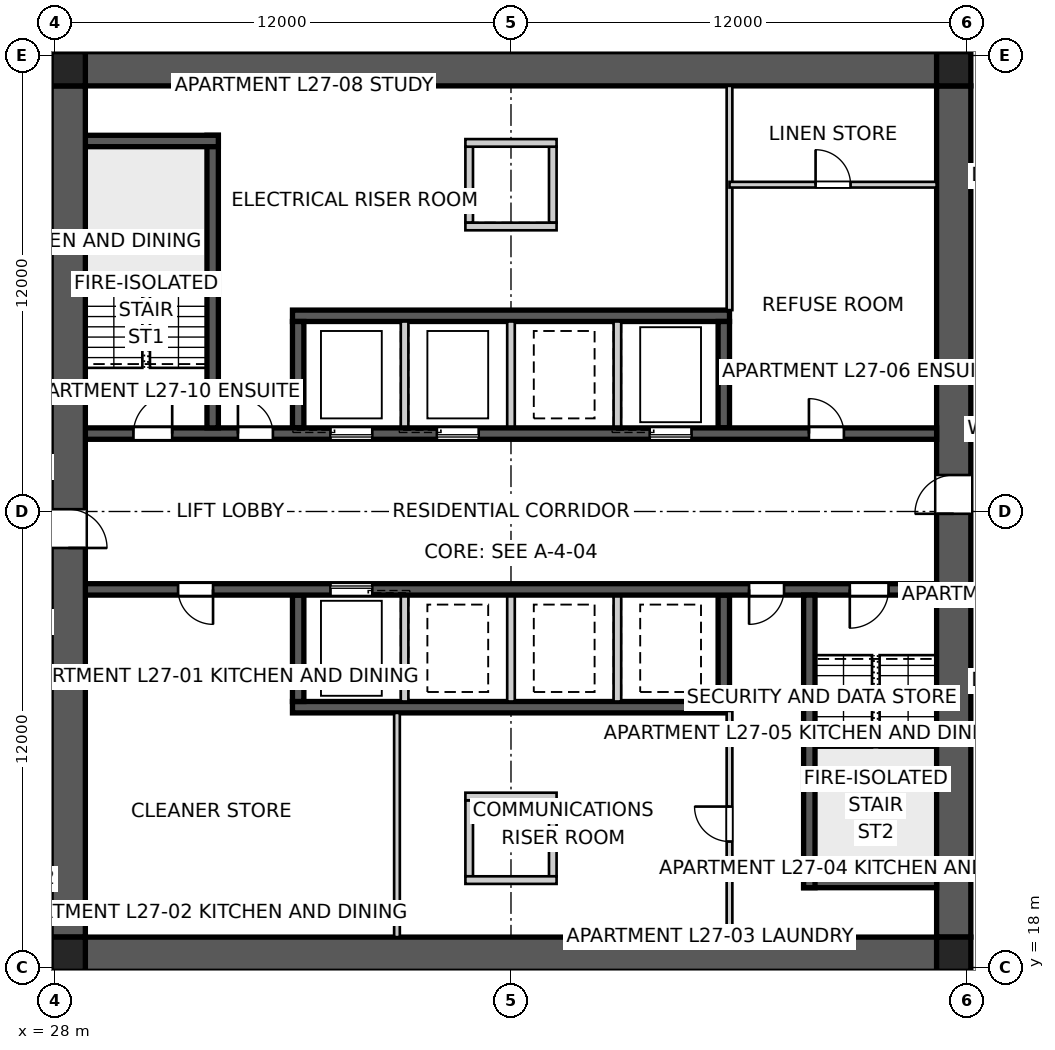
"""IFC4 building model, lengths in metres.
Left out: names, types, materials, properties, quantities, classifications, styles, units other than length and angle.
Written with IfcOpenShell. Run it as: python <this file> out.ifc"""

import sys

from ifc_helpers import new_model, si_unit, direction, frame, frame_2d, origin, origin_2d, place, context, subcontext, project, spatial, polyline, rectangle, outline, extrude, element, fill, save


model = new_model("IFC4")
c1 = context("Model", 3, precision=1e-05, world=origin(), true_north=direction((0.0, 1.0)))
c2 = subcontext(c1, "Body", "Model", "MODEL_VIEW")
j1 = project(units=[si_unit("LENGTHUNIT", "METRE"), si_unit("PLANEANGLEUNIT", "RADIAN")], contexts=[c1])
p1 = place(None, origin())
s1 = spatial("IfcSite", under=j1, at=p1, CompositionType="ELEMENT")
p2 = place(p1, origin())
s2 = spatial("IfcBuilding", under=s1, at=p2, CompositionType="ELEMENT")
p3 = place(p2, frame((0.0, 0.0, 99.8)))
s3 = spatial("IfcBuildingStorey", under=s2, at=p3, CompositionType="ELEMENT", Elevation=99.8)
for number, where, z_axis, x_axis in (
    (1, (28.8, 41.65, 0.0), (0.0, 0.0, 1.0), (1.0, 0.0, 0.0)),
    (2, (51.2, 18.35, 0.0), (0.0, 0.0, 1.0), (-1.0, 0.0, 0.0)),
):
    element("IfcWall", number, at=place(p3, frame(where, z_axis=z_axis, x_axis=x_axis)), inside=s3, PredefinedType="SHEAR", context=c2, shape_type="SweptSolid", body=[
        extrude(outline(polyline([(0.0, -0.45), (22.4, -0.45), (22.4, -0.025), (22.85, -0.025), (22.85, 0.025), (22.4, 0.025), (22.4, 0.45), (0.0, 0.45), (0.0, 0.025), (-0.45, 0.025), (-0.45, -0.025), (0.0, -0.025), (0.0, -0.45)])), origin(), (0.0, 0.0, 1.0), 3.4),
    ])
p4 = place(p3, frame((51.65, 18.8, 0.0), z_axis=(0.0, 0.0, 1.0), x_axis=(0.0, 1.0, 0.0)))
e3 = element("IfcWall", 3, at=p4, inside=s3, PredefinedType="SHEAR", context=c2, shape_type="SweptSolid", body=[
    extrude(outline(polyline([(0.0, -0.45), (22.4, -0.45), (22.4, -0.025), (22.85, -0.025), (22.85, 0.025), (22.4, 0.025), (22.4, 0.45), (0.0, 0.45), (0.0, 0.025), (-0.45, 0.025), (-0.45, -0.025), (0.0, -0.025), (0.0, -0.45)])), origin(), (0.0, 0.0, 1.0), 3.4),
])
p5 = place(p4, frame((11.14, 0.0, 0.0)))
e4 = element("IfcOpeningElement", 4, at=p5, cuts=e3, PredefinedType="OPENING", context=c2, shape_type="SweptSolid", body=[
    extrude(rectangle(XDim=1.02, YDim=2.4, at=frame_2d((0.51, 1.2))), frame((0.0, 0.46, 0.0), z_axis=(0.0, -1.0, 0.0), x_axis=(1.0, 0.0, 0.0)), (0.0, 0.0, 1.0), 0.92),
])
p6 = place(p3, frame((28.35, 41.2, 0.0), z_axis=(0.0, 0.0, 1.0), x_axis=(0.0, -1.0, 0.0)))
e5 = element("IfcWall", 5, at=p6, inside=s3, PredefinedType="SHEAR", context=c2, shape_type="SweptSolid", body=[
    extrude(outline(polyline([(0.0, -0.45), (22.4, -0.45), (22.4, -0.025), (22.85, -0.025), (22.85, 0.025), (22.4, 0.025), (22.4, 0.45), (0.0, 0.45), (0.0, 0.025), (-0.45, 0.025), (-0.45, -0.025), (0.0, -0.025), (0.0, -0.45)])), origin(), (0.0, 0.0, 1.0), 3.4),
])
p7 = place(p6, frame((11.14, 0.0, 0.0)))
e6 = element("IfcOpeningElement", 6, at=p7, cuts=e5, PredefinedType="OPENING", context=c2, shape_type="SweptSolid", body=[
    extrude(rectangle(XDim=1.02, YDim=2.4, at=frame_2d((0.51, 1.2))), frame((0.0, 0.46, 0.0), z_axis=(0.0, -1.0, 0.0), x_axis=(1.0, 0.0, 0.0)), (0.0, 0.0, 1.0), 0.92),
])
p8 = place(p3, frame((28.8, 32.05, 0.0), z_axis=(0.0, 0.0, 1.0), x_axis=(1.0, 0.0, 0.0)))
e7 = element("IfcWall", 7, at=p8, inside=s3, PredefinedType="SHEAR", context=c2, shape_type="SweptSolid", body=[
    extrude(rectangle(XDim=22.4, YDim=0.3, at=frame_2d((11.2, 0.0))), origin(), (0.0, 0.0, 1.0), 3.4),
])
p9 = place(p8, frame((19.04, 0.0, 0.0)))
e8 = element("IfcOpeningElement", 8, at=p9, cuts=e7, PredefinedType="OPENING", context=c2, shape_type="SweptSolid", body=[
    extrude(rectangle(XDim=0.92, YDim=2.1, at=frame_2d((0.46, 1.05))), frame((0.0, 0.16, 0.0), z_axis=(0.0, -1.0, 0.0), x_axis=(1.0, 0.0, 0.0)), (0.0, 0.0, 1.0), 0.32),
])
p10 = place(p8, frame((1.265, 0.0, 0.0)))
e9 = element("IfcOpeningElement", 9, at=p10, cuts=e7, PredefinedType="OPENING", context=c2, shape_type="SweptSolid", body=[
    extrude(rectangle(XDim=1.02, YDim=2.1, at=frame_2d((0.51, 1.05))), frame((0.0, 0.16, 0.0), z_axis=(0.0, -1.0, 0.0), x_axis=(1.0, 0.0, 0.0)), (0.0, 0.0, 1.0), 0.32),
])
p11 = place(p8, frame((4.015, 0.0, 0.0)))
e10 = element("IfcOpeningElement", 10, at=p11, cuts=e7, PredefinedType="OPENING", context=c2, shape_type="SweptSolid", body=[
    extrude(rectangle(XDim=0.92, YDim=2.1, at=frame_2d((0.46, 1.05))), frame((0.0, 0.16, 0.0), z_axis=(0.0, -1.0, 0.0), x_axis=(1.0, 0.0, 0.0)), (0.0, 0.0, 1.0), 0.32),
])
p12 = place(p8, frame((6.45, 0.0, 0.0)))
e11 = element("IfcOpeningElement", 11, at=p12, cuts=e7, PredefinedType="OPENING", context=c2, shape_type="SweptSolid", body=[
    extrude(rectangle(XDim=1.1, YDim=2.1, at=frame_2d((0.55, 1.05))), frame((0.0, 0.16, 0.0), z_axis=(0.0, -1.0, 0.0), x_axis=(1.0, 0.0, 0.0)), (0.0, 0.0, 1.0), 0.32),
])
p13 = place(p8, frame((9.25, 0.0, 0.0)))
e12 = element("IfcOpeningElement", 12, at=p13, cuts=e7, PredefinedType="OPENING", context=c2, shape_type="SweptSolid", body=[
    extrude(rectangle(XDim=1.1, YDim=2.1, at=frame_2d((0.55, 1.05))), frame((0.0, 0.16, 0.0), z_axis=(0.0, -1.0, 0.0), x_axis=(1.0, 0.0, 0.0)), (0.0, 0.0, 1.0), 0.32),
])
p14 = place(p8, frame((14.85, 0.0, 0.0)))
e13 = element("IfcOpeningElement", 13, at=p14, cuts=e7, PredefinedType="OPENING", context=c2, shape_type="SweptSolid", body=[
    extrude(rectangle(XDim=1.1, YDim=2.1, at=frame_2d((0.55, 1.05))), frame((0.0, 0.16, 0.0), z_axis=(0.0, -1.0, 0.0), x_axis=(1.0, 0.0, 0.0)), (0.0, 0.0, 1.0), 0.32),
])
p15 = place(p3, frame((51.2, 27.95, 0.0), z_axis=(0.0, 0.0, 1.0), x_axis=(-1.0, 0.0, 0.0)))
e14 = element("IfcWall", 14, at=p15, inside=s3, PredefinedType="SHEAR", context=c2, shape_type="SweptSolid", body=[
    extrude(rectangle(XDim=22.4, YDim=0.3, at=frame_2d((11.2, 0.0))), origin(), (0.0, 0.0, 1.0), 3.4),
])
p16 = place(p15, frame((19.04, 0.0, 0.0)))
e15 = element("IfcOpeningElement", 15, at=p16, cuts=e14, PredefinedType="OPENING", context=c2, shape_type="SweptSolid", body=[
    extrude(rectangle(XDim=0.92, YDim=2.1, at=frame_2d((0.46, 1.05))), frame((0.0, 0.16, 0.0), z_axis=(0.0, -1.0, 0.0), x_axis=(1.0, 0.0, 0.0)), (0.0, 0.0, 1.0), 0.32),
])
p17 = place(p15, frame((1.265, 0.0, 0.0)))
e16 = element("IfcOpeningElement", 16, at=p17, cuts=e14, PredefinedType="OPENING", context=c2, shape_type="SweptSolid", body=[
    extrude(rectangle(XDim=1.02, YDim=2.1, at=frame_2d((0.51, 1.05))), frame((0.0, 0.16, 0.0), z_axis=(0.0, -1.0, 0.0), x_axis=(1.0, 0.0, 0.0)), (0.0, 0.0, 1.0), 0.32),
])
p18 = place(p15, frame((4.015, 0.0, 0.0)))
e17 = element("IfcOpeningElement", 17, at=p18, cuts=e14, PredefinedType="OPENING", context=c2, shape_type="SweptSolid", body=[
    extrude(rectangle(XDim=0.92, YDim=2.1, at=frame_2d((0.46, 1.05))), frame((0.0, 0.16, 0.0), z_axis=(0.0, -1.0, 0.0), x_axis=(1.0, 0.0, 0.0)), (0.0, 0.0, 1.0), 0.32),
])
p19 = place(p15, frame((14.85, 0.0, 0.0)))
e18 = element("IfcOpeningElement", 18, at=p19, cuts=e14, PredefinedType="OPENING", context=c2, shape_type="SweptSolid", body=[
    extrude(rectangle(XDim=1.1, YDim=2.1, at=frame_2d((0.55, 1.05))), frame((0.0, 0.16, 0.0), z_axis=(0.0, -1.0, 0.0), x_axis=(1.0, 0.0, 0.0)), (0.0, 0.0, 1.0), 0.32),
])
for number, where, z_axis, x_axis in (
    (19, (34.25, 35.15, 0.0), (0.0, 0.0, 1.0), (1.0, 0.0, 0.0)),
    (20, (45.75, 24.85, 0.0), (0.0, 0.0, 1.0), (-1.0, 0.0, 0.0)),
):
    element("IfcWall", number, at=place(p3, frame(where, z_axis=z_axis, x_axis=x_axis)), inside=s3, PredefinedType="SHEAR", context=c2, shape_type="SweptSolid", body=[
        extrude(rectangle(XDim=11.5, YDim=0.3, at=frame_2d((5.75, 0.0))), origin(), (0.0, 0.0, 1.0), 3.4),
    ])
for number, where, z_axis, x_axis in (
    (21, (34.4, 32.2, 0.0), (0.0, 0.0, 1.0), (0.0, 1.0, 0.0)),
    (22, (45.6, 27.8, 0.0), (0.0, 0.0, 1.0), (0.0, -1.0, 0.0)),
):
    element("IfcWall", number, at=place(p3, frame(where, z_axis=z_axis, x_axis=x_axis)), inside=s3, PredefinedType="SHEAR", context=c2, shape_type="SweptSolid", body=[
        extrude(rectangle(XDim=2.8, YDim=0.3, at=frame_2d((1.4, 0.0))), origin(), (0.0, 0.0, 1.0), 3.4),
    ])
for number, where, z_axis, x_axis in (
    (23, (37.2, 32.2, 0.0), (0.0, 0.0, 1.0), (0.0, 1.0, 0.0)),
    (24, (42.8, 27.8, 0.0), (0.0, 0.0, 1.0), (0.0, -1.0, 0.0)),
    (25, (40.0, 32.2, 0.0), (0.0, 0.0, 1.0), (0.0, 1.0, 0.0)),
    (26, (40.0, 27.8, 0.0), (0.0, 0.0, 1.0), (0.0, -1.0, 0.0)),
    (27, (42.8, 32.2, 0.0), (0.0, 0.0, 1.0), (0.0, 1.0, 0.0)),
    (28, (37.2, 27.8, 0.0), (0.0, 0.0, 1.0), (0.0, -1.0, 0.0)),
):
    element("IfcWall", number, at=place(p3, frame(where, z_axis=z_axis, x_axis=x_axis)), inside=s3, PredefinedType="SOLIDWALL", context=c2, shape_type="SweptSolid", body=[
        extrude(rectangle(XDim=2.8, YDim=0.2, at=frame_2d((1.4, 0.0))), origin(), (0.0, 0.0, 1.0), 3.4),
    ])
for number, where, z_axis, x_axis in (
    (29, (45.6, 32.2, 0.0), (0.0, 0.0, 1.0), (0.0, 1.0, 0.0)),
    (30, (34.4, 27.8, 0.0), (0.0, 0.0, 1.0), (0.0, -1.0, 0.0)),
):
    element("IfcWall", number, at=place(p3, frame(where, z_axis=z_axis, x_axis=x_axis)), inside=s3, PredefinedType="SHEAR", context=c2, shape_type="SweptSolid", body=[
        extrude(rectangle(XDim=2.8, YDim=0.3, at=frame_2d((1.4, 0.0))), origin(), (0.0, 0.0, 1.0), 3.4),
    ])
p20 = place(p3, frame((32.15, 32.2, 0.0), z_axis=(0.0, 0.0, 1.0), x_axis=(0.0, 1.0, 0.0)))
e31 = element("IfcWall", 31, at=p20, inside=s3, PredefinedType="SHEAR", context=c2, shape_type="SweptSolid", body=[
    extrude(rectangle(XDim=7.7, YDim=0.3, at=frame_2d((3.85, 0.0))), origin(), (0.0, 0.0, 1.0), 3.4),
])
p21 = place(p3, frame((28.8, 39.75, 0.0), z_axis=(0.0, 0.0, 1.0), x_axis=(1.0, 0.0, 0.0)))
e32 = element("IfcWall", 32, at=p21, inside=s3, PredefinedType="SHEAR", context=c2, shape_type="SweptSolid", body=[
    extrude(rectangle(XDim=3.5, YDim=0.3, at=frame_2d((1.75, 0.0))), origin(), (0.0, 0.0, 1.0), 3.4),
])
p22 = place(p3, frame((47.85, 27.8, 0.0), z_axis=(0.0, 0.0, 1.0), x_axis=(0.0, -1.0, 0.0)))
e33 = element("IfcWall", 33, at=p22, inside=s3, PredefinedType="SHEAR", context=c2, shape_type="SweptSolid", body=[
    extrude(rectangle(XDim=7.7, YDim=0.3, at=frame_2d((3.85, 0.0))), origin(), (0.0, 0.0, 1.0), 3.4),
])
p23 = place(p3, frame((51.2, 20.25, 0.0), z_axis=(0.0, 0.0, 1.0), x_axis=(-1.0, 0.0, 0.0)))
e34 = element("IfcWall", 34, at=p23, inside=s3, PredefinedType="SHEAR", context=c2, shape_type="SweptSolid", body=[
    extrude(rectangle(XDim=3.5, YDim=0.3, at=frame_2d((1.75, 0.0))), origin(), (0.0, 0.0, 1.0), 3.4),
])
for number, where, z_axis, x_axis in (
    (35, (38.9, 37.6, 0.0), (0.0, 0.0, 1.0), (0.0, 1.0, 0.0)),
    (36, (41.1, 37.6, 0.0), (0.0, 0.0, 1.0), (0.0, 1.0, 0.0)),
):
    element("IfcWall", number, at=place(p3, frame(where, z_axis=z_axis, x_axis=x_axis)), inside=s3, PredefinedType="SOLIDWALL", context=c2, shape_type="SweptSolid", body=[
        extrude(rectangle(XDim=2.0, YDim=0.2, at=frame_2d((1.0, 0.0))), origin(), (0.0, 0.0, 1.0), 3.4),
    ])
for number, where, z_axis, x_axis in (
    (37, (38.8, 37.5, 0.0), (0.0, 0.0, 1.0), (1.0, 0.0, 0.0)),
    (38, (38.8, 39.7, 0.0), (0.0, 0.0, 1.0), (1.0, 0.0, 0.0)),
):
    element("IfcWall", number, at=place(p3, frame(where, z_axis=z_axis, x_axis=x_axis)), inside=s3, PredefinedType="SOLIDWALL", context=c2, shape_type="SweptSolid", body=[
        extrude(rectangle(XDim=2.4, YDim=0.2, at=frame_2d((1.2, 0.0))), origin(), (0.0, 0.0, 1.0), 3.4),
    ])
for number, where, z_axis, x_axis in (
    (39, (38.9, 22.4, 0.0), (0.0, 0.0, 1.0), (0.0, -1.0, 0.0)),
    (40, (41.1, 22.4, 0.0), (0.0, 0.0, 1.0), (0.0, -1.0, 0.0)),
):
    element("IfcWall", number, at=place(p3, frame(where, z_axis=z_axis, x_axis=x_axis)), inside=s3, PredefinedType="SOLIDWALL", context=c2, shape_type="SweptSolid", body=[
        extrude(rectangle(XDim=2.0, YDim=0.2, at=frame_2d((1.0, 0.0))), origin(), (0.0, 0.0, 1.0), 3.4),
    ])
for number, where, z_axis, x_axis in (
    (41, (38.8, 22.5, 0.0), (0.0, 0.0, 1.0), (1.0, 0.0, 0.0)),
    (42, (38.8, 20.3, 0.0), (0.0, 0.0, 1.0), (1.0, 0.0, 0.0)),
):
    element("IfcWall", number, at=place(p3, frame(where, z_axis=z_axis, x_axis=x_axis)), inside=s3, PredefinedType="SOLIDWALL", context=c2, shape_type="SweptSolid", body=[
        extrude(rectangle(XDim=2.4, YDim=0.2, at=frame_2d((1.2, 0.0))), origin(), (0.0, 0.0, 1.0), 3.4),
    ])
for number, where, z_axis, x_axis in (
    (43, (28.35, 18.35, 0.0), (0.0, 0.0, 1.0), (1.0, 0.0, 0.0)),
    (44, (51.65, 18.35, 0.0), (0.0, 0.0, 1.0), (1.0, 0.0, 0.0)),
    (45, (51.65, 41.65, 0.0), (0.0, 0.0, 1.0), (1.0, 0.0, 0.0)),
    (46, (28.35, 41.65, 0.0), (0.0, 0.0, 1.0), (1.0, 0.0, 0.0)),
):
    element("IfcColumn", number, at=place(p3, frame(where, z_axis=z_axis, x_axis=x_axis)), inside=s3, PredefinedType="COLUMN", context=c2, shape_type="SweptSolid", body=[
        extrude(rectangle(XDim=0.9, YDim=0.9, at=origin_2d()), origin(), (0.0, 0.0, 1.0), 3.4),
    ])
p24 = place(p3, frame((45.75, 41.2, 0.0), z_axis=(0.0, 0.0, 1.0), x_axis=(0.0, -1.0, 0.0)))
e47 = element("IfcWall", 47, at=p24, inside=s3, PredefinedType="SOLIDWALL", context=c2, shape_type="SweptSolid", body=[
    extrude(rectangle(XDim=5.9, YDim=0.15, at=frame_2d((2.95, 0.0))), origin(), (0.0, 0.0, 1.0), 3.25),
])
p25 = place(p3, frame((45.75, 38.6, 0.0), z_axis=(0.0, 0.0, 1.0), x_axis=(1.0, 0.0, 0.0)))
e48 = element("IfcWall", 48, at=p25, inside=s3, PredefinedType="SOLIDWALL", context=c2, shape_type="SweptSolid", body=[
    extrude(rectangle(XDim=5.45, YDim=0.15, at=frame_2d((2.725, 0.0))), origin(), (0.0, 0.0, 1.0), 3.25),
])
p26 = place(p25, frame((2.265, 0.0, 0.0)))
e49 = element("IfcOpeningElement", 49, at=p26, cuts=e48, PredefinedType="OPENING", context=c2, shape_type="SweptSolid", body=[
    extrude(rectangle(XDim=0.92, YDim=2.1, at=frame_2d((0.46, 1.05))), frame((0.0, 0.085, 0.0), z_axis=(0.0, -1.0, 0.0), x_axis=(1.0, 0.0, 0.0)), (0.0, 0.0, 1.0), 0.17),
])
p27 = place(p3, frame((45.75, 18.8, 0.0), z_axis=(0.0, 0.0, 1.0), x_axis=(0.0, 1.0, 0.0)))
e50 = element("IfcWall", 50, at=p27, inside=s3, PredefinedType="SOLIDWALL", context=c2, shape_type="SweptSolid", body=[
    extrude(rectangle(XDim=5.95, YDim=0.15, at=frame_2d((2.975, 0.0))), origin(), (0.0, 0.0, 1.0), 3.25),
])
p28 = place(p27, frame((2.515, 0.0, 0.0)))
e51 = element("IfcOpeningElement", 51, at=p28, cuts=e50, PredefinedType="OPENING", context=c2, shape_type="SweptSolid", body=[
    extrude(rectangle(XDim=0.92, YDim=2.1, at=frame_2d((0.46, 1.05))), frame((0.0, 0.085, 0.0), z_axis=(0.0, -1.0, 0.0), x_axis=(1.0, 0.0, 0.0)), (0.0, 0.0, 1.0), 0.17),
])
p29 = place(p3, frame((37.0, 18.8, 0.0), z_axis=(0.0, 0.0, 1.0), x_axis=(0.0, 1.0, 0.0)))
e52 = element("IfcWall", 52, at=p29, inside=s3, PredefinedType="SOLIDWALL", context=c2, shape_type="SweptSolid", body=[
    extrude(rectangle(XDim=5.9, YDim=0.15, at=frame_2d((2.95, 0.0))), origin(), (0.0, 0.0, 1.0), 3.25),
])
p30 = place(p9, origin())
e53 = element("IfcDoor", 53, at=p30, inside=s3, OperationType="SINGLE_SWING_LEFT", PredefinedType="DOOR", context=c2, shape_type="SweptSolid", body=[
    extrude(rectangle(XDim=0.92, YDim=2.1, at=frame_2d((0.46, 1.05))), frame((0.0, 0.025, 0.0), z_axis=(0.0, -1.0, 0.0), x_axis=(1.0, 0.0, 0.0)), (0.0, 0.0, 1.0), 0.05),
])
fill(e8, e53)
p31 = place(p16, origin())
e54 = element("IfcDoor", 54, at=p31, inside=s3, OperationType="SINGLE_SWING_LEFT", PredefinedType="DOOR", context=c2, shape_type="SweptSolid", body=[
    extrude(rectangle(XDim=0.92, YDim=2.1, at=frame_2d((0.46, 1.05))), frame((0.0, 0.025, 0.0), z_axis=(0.0, -1.0, 0.0), x_axis=(1.0, 0.0, 0.0)), (0.0, 0.0, 1.0), 0.05),
])
fill(e15, e54)
p32 = place(p17, origin())
e55 = element("IfcDoor", 55, at=p32, inside=s3, OperationType="SINGLE_SWING_RIGHT", PredefinedType="DOOR", context=c2, shape_type="SweptSolid", body=[
    extrude(rectangle(XDim=1.02, YDim=2.1, at=frame_2d((0.51, 1.05))), frame((0.0, 0.025, 0.0), z_axis=(0.0, -1.0, 0.0), x_axis=(1.0, 0.0, 0.0)), (0.0, 0.0, 1.0), 0.05),
])
fill(e16, e55)
p33 = place(p10, origin())
e56 = element("IfcDoor", 56, at=p33, inside=s3, OperationType="SINGLE_SWING_RIGHT", PredefinedType="DOOR", context=c2, shape_type="SweptSolid", body=[
    extrude(rectangle(XDim=1.02, YDim=2.1, at=frame_2d((0.51, 1.05))), frame((0.0, 0.025, 0.0), z_axis=(0.0, -1.0, 0.0), x_axis=(1.0, 0.0, 0.0)), (0.0, 0.0, 1.0), 0.05),
])
fill(e9, e56)
p34 = place(p11, origin())
e57 = element("IfcDoor", 57, at=p34, inside=s3, OperationType="SINGLE_SWING_LEFT", PredefinedType="DOOR", context=c2, shape_type="SweptSolid", body=[
    extrude(rectangle(XDim=0.92, YDim=2.1, at=frame_2d((0.46, 1.05))), frame((0.0, 0.025, 0.0), z_axis=(0.0, -1.0, 0.0), x_axis=(1.0, 0.0, 0.0)), (0.0, 0.0, 1.0), 0.05),
])
fill(e10, e57)
p35 = place(p18, origin())
e58 = element("IfcDoor", 58, at=p35, inside=s3, OperationType="SINGLE_SWING_RIGHT", PredefinedType="DOOR", context=c2, shape_type="SweptSolid", body=[
    extrude(rectangle(XDim=0.92, YDim=2.1, at=frame_2d((0.46, 1.05))), frame((0.0, 0.025, 0.0), z_axis=(0.0, -1.0, 0.0), x_axis=(1.0, 0.0, 0.0)), (0.0, 0.0, 1.0), 0.05),
])
fill(e17, e58)
p36 = place(p26, origin())
e59 = element("IfcDoor", 59, at=p36, inside=s3, OperationType="SINGLE_SWING_LEFT", PredefinedType="DOOR", context=c2, shape_type="SweptSolid", body=[
    extrude(rectangle(XDim=0.92, YDim=2.1, at=frame_2d((0.46, 1.05))), frame((0.0, 0.025, 0.0), z_axis=(0.0, -1.0, 0.0), x_axis=(1.0, 0.0, 0.0)), (0.0, 0.0, 1.0), 0.05),
])
fill(e49, e59)
p37 = place(p28, origin())
e60 = element("IfcDoor", 60, at=p37, inside=s3, OperationType="SINGLE_SWING_RIGHT", PredefinedType="DOOR", context=c2, shape_type="SweptSolid", body=[
    extrude(rectangle(XDim=0.92, YDim=2.1, at=frame_2d((0.46, 1.05))), frame((0.0, 0.025, 0.0), z_axis=(0.0, -1.0, 0.0), x_axis=(1.0, 0.0, 0.0)), (0.0, 0.0, 1.0), 0.05),
])
fill(e51, e60)
p38 = place(p5, origin())
e61 = element("IfcDoor", 61, at=p38, inside=s3, OperationType="SINGLE_SWING_LEFT", PredefinedType="DOOR", context=c2, shape_type="SweptSolid", body=[
    extrude(rectangle(XDim=1.02, YDim=2.4, at=frame_2d((0.51, 1.2))), frame((0.0, 0.025, 0.0), z_axis=(0.0, -1.0, 0.0), x_axis=(1.0, 0.0, 0.0)), (0.0, 0.0, 1.0), 0.05),
])
fill(e4, e61)
p39 = place(p7, origin())
e62 = element("IfcDoor", 62, at=p39, inside=s3, OperationType="SINGLE_SWING_RIGHT", PredefinedType="DOOR", context=c2, shape_type="SweptSolid", body=[
    extrude(rectangle(XDim=1.02, YDim=2.4, at=frame_2d((0.51, 1.2))), frame((0.0, 0.025, 0.0), z_axis=(0.0, -1.0, 0.0), x_axis=(1.0, 0.0, 0.0)), (0.0, 0.0, 1.0), 0.05),
])
fill(e6, e62)
p40 = place(p12, origin())
e63 = element("IfcDoor", 63, at=p40, inside=s3, OperationType="SLIDING_TO_LEFT", PredefinedType="DOOR", context=c2, shape_type="SweptSolid", body=[
    extrude(rectangle(XDim=1.1, YDim=2.1, at=frame_2d((0.55, 1.05))), frame((0.0, 0.025, 0.0), z_axis=(0.0, -1.0, 0.0), x_axis=(1.0, 0.0, 0.0)), (0.0, 0.0, 1.0), 0.05),
])
fill(e11, e63)
p41 = place(p13, origin())
e64 = element("IfcDoor", 64, at=p41, inside=s3, OperationType="SLIDING_TO_LEFT", PredefinedType="DOOR", context=c2, shape_type="SweptSolid", body=[
    extrude(rectangle(XDim=1.1, YDim=2.1, at=frame_2d((0.55, 1.05))), frame((0.0, 0.025, 0.0), z_axis=(0.0, -1.0, 0.0), x_axis=(1.0, 0.0, 0.0)), (0.0, 0.0, 1.0), 0.05),
])
fill(e12, e64)
p42 = place(p14, origin())
e65 = element("IfcDoor", 65, at=p42, inside=s3, OperationType="SLIDING_TO_LEFT", PredefinedType="DOOR", context=c2, shape_type="SweptSolid", body=[
    extrude(rectangle(XDim=1.1, YDim=2.1, at=frame_2d((0.55, 1.05))), frame((0.0, 0.025, 0.0), z_axis=(0.0, -1.0, 0.0), x_axis=(1.0, 0.0, 0.0)), (0.0, 0.0, 1.0), 0.05),
])
fill(e13, e65)
p43 = place(p19, origin())
e66 = element("IfcDoor", 66, at=p43, inside=s3, OperationType="SLIDING_TO_LEFT", PredefinedType="DOOR", context=c2, shape_type="SweptSolid", body=[
    extrude(rectangle(XDim=1.1, YDim=2.1, at=frame_2d((0.55, 1.05))), frame((0.0, 0.025, 0.0), z_axis=(0.0, -1.0, 0.0), x_axis=(1.0, 0.0, 0.0)), (0.0, 0.0, 1.0), 0.05),
])
fill(e18, e66)
save(model, sys.argv[1])
